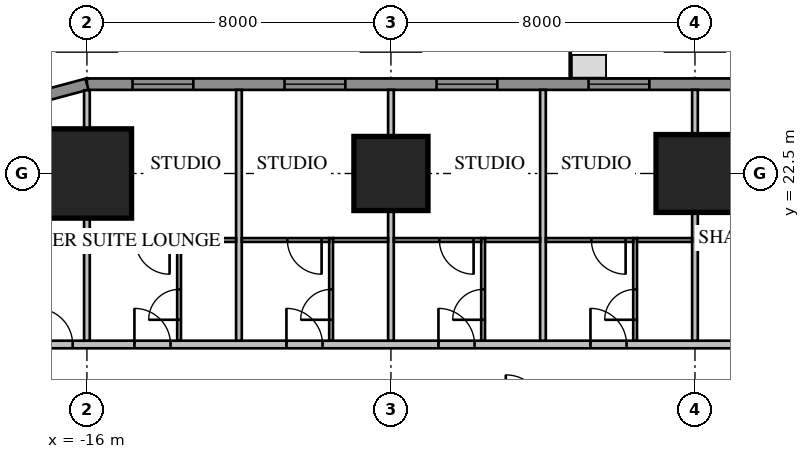
"""IFC4 building model, lengths in metres.
Left out: names, types, materials, properties, quantities, classifications, styles, units other than length and angle.
Written with IfcOpenShell. Run it as: python <this file> out.ifc"""

import sys

from ifc_helpers import new_model, si_unit, direction, frame, frame_2d, origin, origin_2d, place, context, subcontext, project, spatial, rectangle, extrude, element, fill, save


model = new_model("IFC4")
c1 = context("Model", 3, precision=1e-05, world=origin(), true_north=direction((0.0, 1.0)))
c2 = subcontext(c1, "Body", "Model", "MODEL_VIEW")
j1 = project(units=[si_unit("LENGTHUNIT", "METRE"), si_unit("PLANEANGLEUNIT", "RADIAN")], contexts=[c1])
p1 = place(None, origin())
s1 = spatial("IfcSite", under=j1, at=p1, CompositionType="ELEMENT")
p2 = place(p1, origin())
s2 = spatial("IfcBuilding", under=s1, at=p2, CompositionType="ELEMENT")
p3 = place(p2, frame((0.0, 0.0, 23.7)))
s3 = spatial("IfcBuildingStorey", under=s2, at=p3, CompositionType="ELEMENT", Elevation=23.7)
p4 = place(p3, frame((0.0, 22.5, 0.0), z_axis=(0.0, 0.0, 1.0), x_axis=(1.0, 0.0, 0.0)))
e1 = element("IfcColumn", 1, at=p4, inside=s3, PredefinedType="COLUMN", context=c2, shape_type="SweptSolid", body=[
    extrude(rectangle(XDim=2.05, YDim=2.05, at=origin_2d()), origin(), (0.0, 0.0, 1.0), 3.85),
])
p5 = place(p3, frame((-8.0, 22.5, 0.0), z_axis=(0.0, 0.0, 1.0), x_axis=(1.0, 0.0, 0.0)))
e2 = element("IfcColumn", 2, at=p5, inside=s3, PredefinedType="COLUMN", context=c2, shape_type="SweptSolid", body=[
    extrude(rectangle(XDim=1.95, YDim=1.95, at=origin_2d()), origin(), (0.0, 0.0, 1.0), 3.85),
])
p6 = place(p3, frame((-16.0, 22.5, 0.0), z_axis=(0.0, 0.0, 1.0), x_axis=(1.0, 0.0, 0.0)))
e3 = element("IfcColumn", 3, at=p6, inside=s3, PredefinedType="COLUMN", context=c2, shape_type="SweptSolid", body=[
    extrude(rectangle(XDim=2.35, YDim=2.35, at=origin_2d()), origin(), (0.0, 0.0, 1.0), 3.85),
])
p7 = place(p3, frame((16.0, 24.85, 0.0), z_axis=(0.0, 0.0, 1.0), x_axis=(-1.0, 0.0, 0.0)))
e4 = element("IfcWall", 4, at=p7, inside=s3, PredefinedType="SOLIDWALL", context=c2, shape_type="SweptSolid", body=[
    extrude(rectangle(XDim=32.0, YDim=0.3, at=frame_2d((16.0, 0.0))), origin(), (0.0, 0.0, 1.0), 3.65),
])
p8 = place(p7, frame((1.2, 0.0, 0.75)))
e5 = element("IfcOpeningElement", 5, at=p8, cuts=e4, PredefinedType="OPENING", context=c2, shape_type="SweptSolid", body=[
    extrude(rectangle(XDim=1.6, YDim=1.8, at=frame_2d((0.8, 0.9))), frame((0.0, 0.17, 0.0), z_axis=(0.0, -1.0, 0.0), x_axis=(1.0, 0.0, 0.0)), (0.0, 0.0, 1.0), 0.34),
])
p9 = place(p7, frame((5.2, 0.0, 0.75)))
e6 = element("IfcOpeningElement", 6, at=p9, cuts=e4, PredefinedType="OPENING", context=c2, shape_type="SweptSolid", body=[
    extrude(rectangle(XDim=1.6, YDim=1.8, at=frame_2d((0.8, 0.9))), frame((0.0, 0.17, 0.0), z_axis=(0.0, -1.0, 0.0), x_axis=(1.0, 0.0, 0.0)), (0.0, 0.0, 1.0), 0.34),
])
p10 = place(p7, frame((17.2, 0.0, 0.75)))
e7 = element("IfcOpeningElement", 7, at=p10, cuts=e4, PredefinedType="OPENING", context=c2, shape_type="SweptSolid", body=[
    extrude(rectangle(XDim=1.6, YDim=1.8, at=frame_2d((0.8, 0.9))), frame((0.0, 0.17, 0.0), z_axis=(0.0, -1.0, 0.0), x_axis=(1.0, 0.0, 0.0)), (0.0, 0.0, 1.0), 0.34),
])
p11 = place(p7, frame((21.2, 0.0, 0.75)))
e8 = element("IfcOpeningElement", 8, at=p11, cuts=e4, PredefinedType="OPENING", context=c2, shape_type="SweptSolid", body=[
    extrude(rectangle(XDim=1.6, YDim=1.8, at=frame_2d((0.8, 0.9))), frame((0.0, 0.17, 0.0), z_axis=(0.0, -1.0, 0.0), x_axis=(1.0, 0.0, 0.0)), (0.0, 0.0, 1.0), 0.34),
])
p12 = place(p7, frame((25.2, 0.0, 0.75)))
e9 = element("IfcOpeningElement", 9, at=p12, cuts=e4, PredefinedType="OPENING", context=c2, shape_type="SweptSolid", body=[
    extrude(rectangle(XDim=1.6, YDim=1.8, at=frame_2d((0.8, 0.9))), frame((0.0, 0.17, 0.0), z_axis=(0.0, -1.0, 0.0), x_axis=(1.0, 0.0, 0.0)), (0.0, 0.0, 1.0), 0.34),
])
p13 = place(p7, frame((29.2, 0.0, 0.75)))
e10 = element("IfcOpeningElement", 10, at=p13, cuts=e4, PredefinedType="OPENING", context=c2, shape_type="SweptSolid", body=[
    extrude(rectangle(XDim=1.6, YDim=1.8, at=frame_2d((0.8, 0.9))), frame((0.0, 0.17, 0.0), z_axis=(0.0, -1.0, 0.0), x_axis=(1.0, 0.0, 0.0)), (0.0, 0.0, 1.0), 0.34),
])
p14 = place(p7, frame((8.8, 0.0, 0.75)))
e11 = element("IfcOpeningElement", 11, at=p14, cuts=e4, PredefinedType="OPENING", context=c2, shape_type="SweptSolid", body=[
    extrude(rectangle(XDim=2.4, YDim=1.8, at=frame_2d((1.2, 0.9))), frame((0.0, 0.17, 0.0), z_axis=(0.0, -1.0, 0.0), x_axis=(1.0, 0.0, 0.0)), (0.0, 0.0, 1.0), 0.34),
])
p15 = place(p7, frame((13.812, 0.0, 0.0)))
e12 = element("IfcOpeningElement", 12, at=p15, cuts=e4, PredefinedType="OPENING", context=c2, shape_type="SweptSolid", body=[
    extrude(rectangle(XDim=1.0, YDim=2.4, at=frame_2d((0.5, 1.2))), frame((0.0, 0.17, 0.0), z_axis=(0.0, -1.0, 0.0), x_axis=(1.0, 0.0, 0.0)), (0.0, 0.0, 1.0), 0.34),
])
p16 = place(p3, frame((-16.0, 24.85, 0.0), z_axis=(0.0, 0.0, 1.0), x_axis=(-0.965920218567, -0.258839972501, 0.0)))
e13 = element("IfcWall", 13, at=p16, inside=s3, PredefinedType="SOLIDWALL", context=c2, shape_type="SweptSolid", body=[
    extrude(rectangle(XDim=4.581, YDim=0.3, at=frame_2d((2.291, 0.0))), origin(), (0.0, 0.0, 1.0), 3.65),
])
p17 = place(p3, frame((18.0, 18.0, 0.0), z_axis=(0.0, 0.0, 1.0), x_axis=(-1.0, 0.0, 0.0)))
e14 = element("IfcWall", 14, at=p17, inside=s3, PredefinedType="PARTITIONING", context=c2, shape_type="SweptSolid", body=[
    extrude(rectangle(XDim=36.0, YDim=0.2, at=frame_2d((18.0, 0.0))), origin(), (0.0, 0.0, 1.0), 3.65),
])
p18 = place(p17, frame((0.375, 0.0, 0.0)))
e15 = element("IfcOpeningElement", 15, at=p18, cuts=e14, PredefinedType="OPENING", context=c2, shape_type="SweptSolid", body=[
    extrude(rectangle(XDim=1.0, YDim=2.1, at=frame_2d((0.5, 1.05))), frame((0.0, 0.12, 0.0), z_axis=(0.0, -1.0, 0.0), x_axis=(1.0, 0.0, 0.0)), (0.0, 0.0, 1.0), 0.24),
])
p19 = place(p17, frame((3.8, 0.0, 0.0)))
e16 = element("IfcOpeningElement", 16, at=p19, cuts=e14, PredefinedType="OPENING", context=c2, shape_type="SweptSolid", body=[
    extrude(rectangle(XDim=0.95, YDim=2.1, at=frame_2d((0.475, 1.05))), frame((0.0, 0.12, 0.0), z_axis=(0.0, -1.0, 0.0), x_axis=(1.0, 0.0, 0.0)), (0.0, 0.0, 1.0), 0.24),
])
p20 = place(p17, frame((7.8, 0.0, 0.0)))
e17 = element("IfcOpeningElement", 17, at=p20, cuts=e14, PredefinedType="OPENING", context=c2, shape_type="SweptSolid", body=[
    extrude(rectangle(XDim=0.95, YDim=2.1, at=frame_2d((0.475, 1.05))), frame((0.0, 0.12, 0.0), z_axis=(0.0, -1.0, 0.0), x_axis=(1.0, 0.0, 0.0)), (0.0, 0.0, 1.0), 0.24),
])
p21 = place(p17, frame((19.8, 0.0, 0.0)))
e18 = element("IfcOpeningElement", 18, at=p21, cuts=e14, PredefinedType="OPENING", context=c2, shape_type="SweptSolid", body=[
    extrude(rectangle(XDim=0.95, YDim=2.1, at=frame_2d((0.475, 1.05))), frame((0.0, 0.12, 0.0), z_axis=(0.0, -1.0, 0.0), x_axis=(1.0, 0.0, 0.0)), (0.0, 0.0, 1.0), 0.24),
])
p22 = place(p17, frame((23.8, 0.0, 0.0)))
e19 = element("IfcOpeningElement", 19, at=p22, cuts=e14, PredefinedType="OPENING", context=c2, shape_type="SweptSolid", body=[
    extrude(rectangle(XDim=0.95, YDim=2.1, at=frame_2d((0.475, 1.05))), frame((0.0, 0.12, 0.0), z_axis=(0.0, -1.0, 0.0), x_axis=(1.0, 0.0, 0.0)), (0.0, 0.0, 1.0), 0.24),
])
p23 = place(p17, frame((27.8, 0.0, 0.0)))
e20 = element("IfcOpeningElement", 20, at=p23, cuts=e14, PredefinedType="OPENING", context=c2, shape_type="SweptSolid", body=[
    extrude(rectangle(XDim=0.95, YDim=2.1, at=frame_2d((0.475, 1.05))), frame((0.0, 0.12, 0.0), z_axis=(0.0, -1.0, 0.0), x_axis=(1.0, 0.0, 0.0)), (0.0, 0.0, 1.0), 0.24),
])
p24 = place(p17, frame((31.8, 0.0, 0.0)))
e21 = element("IfcOpeningElement", 21, at=p24, cuts=e14, PredefinedType="OPENING", context=c2, shape_type="SweptSolid", body=[
    extrude(rectangle(XDim=0.95, YDim=2.1, at=frame_2d((0.475, 1.05))), frame((0.0, 0.12, 0.0), z_axis=(0.0, -1.0, 0.0), x_axis=(1.0, 0.0, 0.0)), (0.0, 0.0, 1.0), 0.24),
])
p25 = place(p17, frame((34.375, 0.0, 0.0)))
e22 = element("IfcOpeningElement", 22, at=p25, cuts=e14, PredefinedType="OPENING", context=c2, shape_type="SweptSolid", body=[
    extrude(rectangle(XDim=0.95, YDim=2.1, at=frame_2d((0.475, 1.05))), frame((0.0, 0.12, 0.0), z_axis=(0.0, -1.0, 0.0), x_axis=(1.0, 0.0, 0.0)), (0.0, 0.0, 1.0), 0.24),
])
p26 = place(p17, frame((11.2, 0.0, 0.0)))
e23 = element("IfcOpeningElement", 23, at=p26, cuts=e14, PredefinedType="OPENING", context=c2, shape_type="SweptSolid", body=[
    extrude(rectangle(XDim=1.0, YDim=2.1, at=frame_2d((0.5, 1.05))), frame((0.0, 0.12, 0.0), z_axis=(0.0, -1.0, 0.0), x_axis=(1.0, 0.0, 0.0)), (0.0, 0.0, 1.0), 0.24),
])
p27 = place(p3, frame((0.0, 18.1, 0.0), z_axis=(0.0, 0.0, 1.0), x_axis=(0.0, 1.0, 0.0)))
e24 = element("IfcWall", 24, at=p27, inside=s3, PredefinedType="PARTITIONING", context=c2, shape_type="SweptSolid", body=[
    extrude(rectangle(XDim=6.6, YDim=0.15, at=frame_2d((3.3, 0.0))), origin(), (0.0, 0.0, 1.0), 2.809),
])
for number, where, z_axis, x_axis in (
    (25, (-4.0, 18.1, 0.0), (0.0, 0.0, 1.0), (0.0, 1.0, 0.0)),
    (26, (-8.0, 18.1, 0.0), (0.0, 0.0, 1.0), (0.0, 1.0, 0.0)),
    (27, (-12.0, 18.1, 0.0), (0.0, 0.0, 1.0), (0.0, 1.0, 0.0)),
):
    element("IfcWall", number, at=place(p3, frame(where, z_axis=z_axis, x_axis=x_axis)), inside=s3, PredefinedType="PARTITIONING", context=c2, shape_type="SweptSolid", body=[
        extrude(rectangle(XDim=6.6, YDim=0.15, at=frame_2d((3.3, 0.0))), origin(), (0.0, 0.0, 1.0), 3.65),
    ])
p28 = place(p3, frame((-16.0, 18.1, 0.0), z_axis=(0.0, 0.0, 1.0), x_axis=(0.0, 1.0, 0.0)))
e28 = element("IfcWall", 28, at=p28, inside=s3, PredefinedType="PARTITIONING", context=c2, shape_type="SweptSolid", body=[
    extrude(rectangle(XDim=6.589, YDim=0.15, at=frame_2d((3.295, 0.0))), origin(), (0.0, 0.0, 1.0), 3.65),
])
p29 = place(p3, frame((-1.575, 18.1, 0.0), z_axis=(0.0, 0.0, 1.0), x_axis=(0.0, 1.0, 0.0)))
e29 = element("IfcWall", 29, at=p29, inside=s3, PredefinedType="PARTITIONING", context=c2, shape_type="SweptSolid", body=[
    extrude(rectangle(XDim=2.7, YDim=0.1, at=frame_2d((1.35, 0.0))), origin(), (0.0, 0.0, 1.0), 3.65),
])
p30 = place(p29, frame((0.55, 0.0, 0.0)))
e30 = element("IfcOpeningElement", 30, at=p30, cuts=e29, PredefinedType="OPENING", context=c2, shape_type="SweptSolid", body=[
    extrude(rectangle(XDim=0.8, YDim=2.1, at=frame_2d((0.4, 1.05))), frame((0.0, 0.07, 0.0), z_axis=(0.0, -1.0, 0.0), x_axis=(1.0, 0.0, 0.0)), (0.0, 0.0, 1.0), 0.14),
])
p31 = place(p3, frame((-0.075, 20.75, 0.0), z_axis=(0.0, 0.0, 1.0), x_axis=(-1.0, 0.0, 0.0)))
e31 = element("IfcWall", 31, at=p31, inside=s3, PredefinedType="PARTITIONING", context=c2, shape_type="SweptSolid", body=[
    extrude(rectangle(XDim=1.45, YDim=0.1, at=frame_2d((0.725, 0.0))), origin(), (0.0, 0.0, 1.0), 3.65),
])
p32 = place(p3, frame((-5.575, 18.1, 0.0), z_axis=(0.0, 0.0, 1.0), x_axis=(0.0, 1.0, 0.0)))
e32 = element("IfcWall", 32, at=p32, inside=s3, PredefinedType="PARTITIONING", context=c2, shape_type="SweptSolid", body=[
    extrude(rectangle(XDim=2.7, YDim=0.1, at=frame_2d((1.35, 0.0))), origin(), (0.0, 0.0, 1.0), 3.65),
])
p33 = place(p32, frame((0.55, 0.0, 0.0)))
e33 = element("IfcOpeningElement", 33, at=p33, cuts=e32, PredefinedType="OPENING", context=c2, shape_type="SweptSolid", body=[
    extrude(rectangle(XDim=0.8, YDim=2.1, at=frame_2d((0.4, 1.05))), frame((0.0, 0.07, 0.0), z_axis=(0.0, -1.0, 0.0), x_axis=(1.0, 0.0, 0.0)), (0.0, 0.0, 1.0), 0.14),
])
p34 = place(p3, frame((-4.075, 20.75, 0.0), z_axis=(0.0, 0.0, 1.0), x_axis=(-1.0, 0.0, 0.0)))
e34 = element("IfcWall", 34, at=p34, inside=s3, PredefinedType="PARTITIONING", context=c2, shape_type="SweptSolid", body=[
    extrude(rectangle(XDim=1.45, YDim=0.1, at=frame_2d((0.725, 0.0))), origin(), (0.0, 0.0, 1.0), 3.65),
])
p35 = place(p3, frame((-9.575, 18.1, 0.0), z_axis=(0.0, 0.0, 1.0), x_axis=(0.0, 1.0, 0.0)))
e35 = element("IfcWall", 35, at=p35, inside=s3, PredefinedType="PARTITIONING", context=c2, shape_type="SweptSolid", body=[
    extrude(rectangle(XDim=2.7, YDim=0.1, at=frame_2d((1.35, 0.0))), origin(), (0.0, 0.0, 1.0), 3.65),
])
p36 = place(p35, frame((0.55, 0.0, 0.0)))
e36 = element("IfcOpeningElement", 36, at=p36, cuts=e35, PredefinedType="OPENING", context=c2, shape_type="SweptSolid", body=[
    extrude(rectangle(XDim=0.8, YDim=2.1, at=frame_2d((0.4, 1.05))), frame((0.0, 0.07, 0.0), z_axis=(0.0, -1.0, 0.0), x_axis=(1.0, 0.0, 0.0)), (0.0, 0.0, 1.0), 0.14),
])
p37 = place(p3, frame((-8.075, 20.75, 0.0), z_axis=(0.0, 0.0, 1.0), x_axis=(-1.0, 0.0, 0.0)))
e37 = element("IfcWall", 37, at=p37, inside=s3, PredefinedType="PARTITIONING", context=c2, shape_type="SweptSolid", body=[
    extrude(rectangle(XDim=1.45, YDim=0.1, at=frame_2d((0.725, 0.0))), origin(), (0.0, 0.0, 1.0), 3.65),
])
p38 = place(p3, frame((-13.575, 18.1, 0.0), z_axis=(0.0, 0.0, 1.0), x_axis=(0.0, 1.0, 0.0)))
e38 = element("IfcWall", 38, at=p38, inside=s3, PredefinedType="PARTITIONING", context=c2, shape_type="SweptSolid", body=[
    extrude(rectangle(XDim=2.7, YDim=0.1, at=frame_2d((1.35, 0.0))), origin(), (0.0, 0.0, 1.0), 3.65),
])
p39 = place(p38, frame((0.55, 0.0, 0.0)))
e39 = element("IfcOpeningElement", 39, at=p39, cuts=e38, PredefinedType="OPENING", context=c2, shape_type="SweptSolid", body=[
    extrude(rectangle(XDim=0.8, YDim=2.1, at=frame_2d((0.4, 1.05))), frame((0.0, 0.07, 0.0), z_axis=(0.0, -1.0, 0.0), x_axis=(1.0, 0.0, 0.0)), (0.0, 0.0, 1.0), 0.14),
])
p40 = place(p3, frame((-12.075, 20.75, 0.0), z_axis=(0.0, 0.0, 1.0), x_axis=(-1.0, 0.0, 0.0)))
e40 = element("IfcWall", 40, at=p40, inside=s3, PredefinedType="PARTITIONING", context=c2, shape_type="SweptSolid", body=[
    extrude(rectangle(XDim=1.45, YDim=0.1, at=frame_2d((0.725, 0.0))), origin(), (0.0, 0.0, 1.0), 3.65),
])
p41 = place(p3, frame((-1.625, 20.75, 0.0), z_axis=(0.0, 0.0, 1.0), x_axis=(-1.0, 0.0, 0.0)))
e41 = element("IfcWall", 41, at=p41, inside=s3, PredefinedType="PARTITIONING", context=c2, shape_type="SweptSolid", body=[
    extrude(rectangle(XDim=2.3, YDim=0.1, at=frame_2d((1.15, 0.0))), origin(), (0.0, 0.0, 1.0), 3.65),
])
p42 = place(p41, frame((0.2, 0.0, 0.0)))
e42 = element("IfcOpeningElement", 42, at=p42, cuts=e41, PredefinedType="OPENING", context=c2, shape_type="SweptSolid", body=[
    extrude(rectangle(XDim=0.9, YDim=2.1, at=frame_2d((0.45, 1.05))), frame((0.0, 0.07, 0.0), z_axis=(0.0, -1.0, 0.0), x_axis=(1.0, 0.0, 0.0)), (0.0, 0.0, 1.0), 0.14),
])
p43 = place(p3, frame((-5.625, 20.75, 0.0), z_axis=(0.0, 0.0, 1.0), x_axis=(-1.0, 0.0, 0.0)))
e43 = element("IfcWall", 43, at=p43, inside=s3, PredefinedType="PARTITIONING", context=c2, shape_type="SweptSolid", body=[
    extrude(rectangle(XDim=2.3, YDim=0.1, at=frame_2d((1.15, 0.0))), origin(), (0.0, 0.0, 1.0), 3.65),
])
p44 = place(p43, frame((0.2, 0.0, 0.0)))
e44 = element("IfcOpeningElement", 44, at=p44, cuts=e43, PredefinedType="OPENING", context=c2, shape_type="SweptSolid", body=[
    extrude(rectangle(XDim=0.9, YDim=2.1, at=frame_2d((0.45, 1.05))), frame((0.0, 0.07, 0.0), z_axis=(0.0, -1.0, 0.0), x_axis=(1.0, 0.0, 0.0)), (0.0, 0.0, 1.0), 0.14),
])
p45 = place(p3, frame((-9.625, 20.75, 0.0), z_axis=(0.0, 0.0, 1.0), x_axis=(-1.0, 0.0, 0.0)))
e45 = element("IfcWall", 45, at=p45, inside=s3, PredefinedType="PARTITIONING", context=c2, shape_type="SweptSolid", body=[
    extrude(rectangle(XDim=2.3, YDim=0.1, at=frame_2d((1.15, 0.0))), origin(), (0.0, 0.0, 1.0), 3.65),
])
p46 = place(p45, frame((0.2, 0.0, 0.0)))
e46 = element("IfcOpeningElement", 46, at=p46, cuts=e45, PredefinedType="OPENING", context=c2, shape_type="SweptSolid", body=[
    extrude(rectangle(XDim=0.9, YDim=2.1, at=frame_2d((0.45, 1.05))), frame((0.0, 0.07, 0.0), z_axis=(0.0, -1.0, 0.0), x_axis=(1.0, 0.0, 0.0)), (0.0, 0.0, 1.0), 0.14),
])
p47 = place(p3, frame((-13.625, 20.75, 0.0), z_axis=(0.0, 0.0, 1.0), x_axis=(-1.0, 0.0, 0.0)))
e47 = element("IfcWall", 47, at=p47, inside=s3, PredefinedType="PARTITIONING", context=c2, shape_type="SweptSolid", body=[
    extrude(rectangle(XDim=2.3, YDim=0.1, at=frame_2d((1.15, 0.0))), origin(), (0.0, 0.0, 1.0), 3.65),
])
p48 = place(p47, frame((0.2, 0.0, 0.0)))
e48 = element("IfcOpeningElement", 48, at=p48, cuts=e47, PredefinedType="OPENING", context=c2, shape_type="SweptSolid", body=[
    extrude(rectangle(XDim=0.9, YDim=2.1, at=frame_2d((0.45, 1.05))), frame((0.0, 0.07, 0.0), z_axis=(0.0, -1.0, 0.0), x_axis=(1.0, 0.0, 0.0)), (0.0, 0.0, 1.0), 0.14),
])
p49 = place(p10, origin())
e49 = element("IfcWindow", 49, at=p49, inside=s3, PartitioningType="SINGLE_PANEL", PredefinedType="WINDOW", context=c2, shape_type="SweptSolid", body=[
    extrude(rectangle(XDim=1.6, YDim=1.8, at=frame_2d((0.8, 0.9))), frame((0.0, 0.03, 0.0), z_axis=(0.0, -1.0, 0.0), x_axis=(1.0, 0.0, 0.0)), (0.0, 0.0, 1.0), 0.06),
])
fill(e7, e49)
p50 = place(p11, origin())
e50 = element("IfcWindow", 50, at=p50, inside=s3, PartitioningType="SINGLE_PANEL", PredefinedType="WINDOW", context=c2, shape_type="SweptSolid", body=[
    extrude(rectangle(XDim=1.6, YDim=1.8, at=frame_2d((0.8, 0.9))), frame((0.0, 0.03, 0.0), z_axis=(0.0, -1.0, 0.0), x_axis=(1.0, 0.0, 0.0)), (0.0, 0.0, 1.0), 0.06),
])
fill(e8, e50)
p51 = place(p12, origin())
e51 = element("IfcWindow", 51, at=p51, inside=s3, PartitioningType="SINGLE_PANEL", PredefinedType="WINDOW", context=c2, shape_type="SweptSolid", body=[
    extrude(rectangle(XDim=1.6, YDim=1.8, at=frame_2d((0.8, 0.9))), frame((0.0, 0.03, 0.0), z_axis=(0.0, -1.0, 0.0), x_axis=(1.0, 0.0, 0.0)), (0.0, 0.0, 1.0), 0.06),
])
fill(e9, e51)
p52 = place(p13, origin())
e52 = element("IfcWindow", 52, at=p52, inside=s3, PartitioningType="SINGLE_PANEL", PredefinedType="WINDOW", context=c2, shape_type="SweptSolid", body=[
    extrude(rectangle(XDim=1.6, YDim=1.8, at=frame_2d((0.8, 0.9))), frame((0.0, 0.03, 0.0), z_axis=(0.0, -1.0, 0.0), x_axis=(1.0, 0.0, 0.0)), (0.0, 0.0, 1.0), 0.06),
])
fill(e10, e52)
p53 = place(p21, origin())
e53 = element("IfcDoor", 53, at=p53, inside=s3, OperationType="SINGLE_SWING_RIGHT", PredefinedType="DOOR", context=c2, shape_type="SweptSolid", body=[
    extrude(rectangle(XDim=0.95, YDim=2.1, at=frame_2d((0.475, 1.05))), frame((0.0, 0.025, 0.0), z_axis=(0.0, -1.0, 0.0), x_axis=(1.0, 0.0, 0.0)), (0.0, 0.0, 1.0), 0.05),
])
fill(e18, e53)
p54 = place(p30, origin())
e54 = element("IfcDoor", 54, at=p54, inside=s3, OperationType="SINGLE_SWING_LEFT", PredefinedType="DOOR", context=c2, shape_type="SweptSolid", body=[
    extrude(rectangle(XDim=0.8, YDim=2.1, at=frame_2d((0.4, 1.05))), frame((0.0, 0.025, 0.0), z_axis=(0.0, -1.0, 0.0), x_axis=(1.0, 0.0, 0.0)), (0.0, 0.0, 1.0), 0.05),
])
fill(e30, e54)
p55 = place(p22, origin())
e55 = element("IfcDoor", 55, at=p55, inside=s3, OperationType="SINGLE_SWING_RIGHT", PredefinedType="DOOR", context=c2, shape_type="SweptSolid", body=[
    extrude(rectangle(XDim=0.95, YDim=2.1, at=frame_2d((0.475, 1.05))), frame((0.0, 0.025, 0.0), z_axis=(0.0, -1.0, 0.0), x_axis=(1.0, 0.0, 0.0)), (0.0, 0.0, 1.0), 0.05),
])
fill(e19, e55)
p56 = place(p33, origin())
e56 = element("IfcDoor", 56, at=p56, inside=s3, OperationType="SINGLE_SWING_LEFT", PredefinedType="DOOR", context=c2, shape_type="SweptSolid", body=[
    extrude(rectangle(XDim=0.8, YDim=2.1, at=frame_2d((0.4, 1.05))), frame((0.0, 0.025, 0.0), z_axis=(0.0, -1.0, 0.0), x_axis=(1.0, 0.0, 0.0)), (0.0, 0.0, 1.0), 0.05),
])
fill(e33, e56)
p57 = place(p23, origin())
e57 = element("IfcDoor", 57, at=p57, inside=s3, OperationType="SINGLE_SWING_RIGHT", PredefinedType="DOOR", context=c2, shape_type="SweptSolid", body=[
    extrude(rectangle(XDim=0.95, YDim=2.1, at=frame_2d((0.475, 1.05))), frame((0.0, 0.025, 0.0), z_axis=(0.0, -1.0, 0.0), x_axis=(1.0, 0.0, 0.0)), (0.0, 0.0, 1.0), 0.05),
])
fill(e20, e57)
p58 = place(p36, origin())
e58 = element("IfcDoor", 58, at=p58, inside=s3, OperationType="SINGLE_SWING_LEFT", PredefinedType="DOOR", context=c2, shape_type="SweptSolid", body=[
    extrude(rectangle(XDim=0.8, YDim=2.1, at=frame_2d((0.4, 1.05))), frame((0.0, 0.025, 0.0), z_axis=(0.0, -1.0, 0.0), x_axis=(1.0, 0.0, 0.0)), (0.0, 0.0, 1.0), 0.05),
])
fill(e36, e58)
p59 = place(p24, origin())
e59 = element("IfcDoor", 59, at=p59, inside=s3, OperationType="SINGLE_SWING_RIGHT", PredefinedType="DOOR", context=c2, shape_type="SweptSolid", body=[
    extrude(rectangle(XDim=0.95, YDim=2.1, at=frame_2d((0.475, 1.05))), frame((0.0, 0.025, 0.0), z_axis=(0.0, -1.0, 0.0), x_axis=(1.0, 0.0, 0.0)), (0.0, 0.0, 1.0), 0.05),
])
fill(e21, e59)
p60 = place(p39, origin())
e60 = element("IfcDoor", 60, at=p60, inside=s3, OperationType="SINGLE_SWING_LEFT", PredefinedType="DOOR", context=c2, shape_type="SweptSolid", body=[
    extrude(rectangle(XDim=0.8, YDim=2.1, at=frame_2d((0.4, 1.05))), frame((0.0, 0.025, 0.0), z_axis=(0.0, -1.0, 0.0), x_axis=(1.0, 0.0, 0.0)), (0.0, 0.0, 1.0), 0.05),
])
fill(e39, e60)
p61 = place(p25, origin())
e61 = element("IfcDoor", 61, at=p61, inside=s3, OperationType="SINGLE_SWING_RIGHT", PredefinedType="DOOR", context=c2, shape_type="SweptSolid", body=[
    extrude(rectangle(XDim=0.95, YDim=2.1, at=frame_2d((0.475, 1.05))), frame((0.0, 0.025, 0.0), z_axis=(0.0, -1.0, 0.0), x_axis=(1.0, 0.0, 0.0)), (0.0, 0.0, 1.0), 0.05),
])
fill(e22, e61)
p62 = place(p42, origin())
e62 = element("IfcDoor", 62, at=p62, inside=s3, OperationType="SINGLE_SWING_LEFT", PredefinedType="DOOR", context=c2, shape_type="SweptSolid", body=[
    extrude(rectangle(XDim=0.9, YDim=2.1, at=frame_2d((0.45, 1.05))), frame((0.0, 0.025, 0.0), z_axis=(0.0, -1.0, 0.0), x_axis=(1.0, 0.0, 0.0)), (0.0, 0.0, 1.0), 0.05),
])
fill(e42, e62)
p63 = place(p44, origin())
e63 = element("IfcDoor", 63, at=p63, inside=s3, OperationType="SINGLE_SWING_LEFT", PredefinedType="DOOR", context=c2, shape_type="SweptSolid", body=[
    extrude(rectangle(XDim=0.9, YDim=2.1, at=frame_2d((0.45, 1.05))), frame((0.0, 0.025, 0.0), z_axis=(0.0, -1.0, 0.0), x_axis=(1.0, 0.0, 0.0)), (0.0, 0.0, 1.0), 0.05),
])
fill(e44, e63)
p64 = place(p46, origin())
e64 = element("IfcDoor", 64, at=p64, inside=s3, OperationType="SINGLE_SWING_LEFT", PredefinedType="DOOR", context=c2, shape_type="SweptSolid", body=[
    extrude(rectangle(XDim=0.9, YDim=2.1, at=frame_2d((0.45, 1.05))), frame((0.0, 0.025, 0.0), z_axis=(0.0, -1.0, 0.0), x_axis=(1.0, 0.0, 0.0)), (0.0, 0.0, 1.0), 0.05),
])
fill(e46, e64)
p65 = place(p48, origin())
e65 = element("IfcDoor", 65, at=p65, inside=s3, OperationType="SINGLE_SWING_LEFT", PredefinedType="DOOR", context=c2, shape_type="SweptSolid", body=[
    extrude(rectangle(XDim=0.9, YDim=2.1, at=frame_2d((0.45, 1.05))), frame((0.0, 0.025, 0.0), z_axis=(0.0, -1.0, 0.0), x_axis=(1.0, 0.0, 0.0)), (0.0, 0.0, 1.0), 0.05),
])
fill(e48, e65)
save(model, sys.argv[1])
